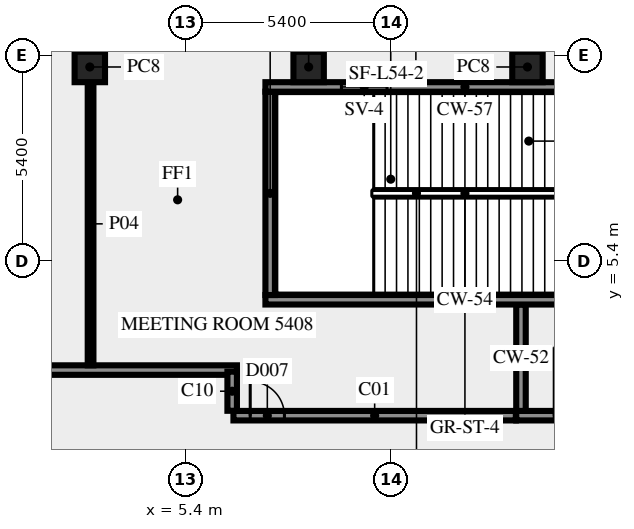
"""IFC4 building model, lengths in metres.
Left out: names, types, materials, properties, quantities, classifications, styles, units other than length and angle.
Written with IfcOpenShell. Run it as: python <this file> out.ifc"""

import sys

from ifc_helpers import new_model, si_unit, direction, frame, frame_2d, origin, origin_2d, place, context, subcontext, project, spatial, rectangle, extrude, element, fill, save


model = new_model("IFC4")
c1 = context("Model", 3, precision=1e-05, world=origin(), true_north=direction((0.0, 1.0)))
c2 = subcontext(c1, "Body", "Model", "MODEL_VIEW")
j1 = project(units=[si_unit("LENGTHUNIT", "METRE"), si_unit("PLANEANGLEUNIT", "RADIAN")], contexts=[c1])
p1 = place(None, origin())
s1 = spatial("IfcSite", under=j1, at=p1, CompositionType="ELEMENT")
p2 = place(p1, origin())
s2 = spatial("IfcBuilding", under=s1, at=p2, CompositionType="ELEMENT")
p3 = place(p2, frame((0.0, 0.0, 230.0)))
s3 = spatial("IfcBuildingStorey", under=s2, at=p3, CompositionType="ELEMENT", Elevation=230.0)
for number, where, z_axis, x_axis in (
    (1, (14.395, 10.5, 0.0), (0.0, 0.0, 1.0), (-1.0, 0.0, 0.0)),
    (2, (8.637, 10.5, 0.0), (0.0, 0.0, 1.0), (-1.0, 0.0, 0.0)),
    (3, (2.879, 10.5, 0.0), (0.0, 0.0, 1.0), (-1.0, 0.0, 0.0)),
):
    element("IfcColumn", number, at=place(p3, frame(where, z_axis=z_axis, x_axis=x_axis)), inside=s3, PredefinedType="COLUMN", context=c2, shape_type="SweptSolid", body=[
        extrude(rectangle(XDim=0.8, YDim=0.8, at=origin_2d()), origin(), (0.0, 0.0, 1.0), 3.65),
    ])
p4 = place(p3, frame((14.1, 1.325, 0.0), z_axis=(0.0, 0.0, 1.0), x_axis=(1.0, 0.0, 0.0)))
e4 = element("IfcWall", 4, at=p4, inside=s3, PredefinedType="SHEAR", context=c2, shape_type="SweptSolid", body=[
    extrude(rectangle(XDim=3.9, YDim=0.25, at=frame_2d((1.95, 0.0))), origin(), (0.0, 0.0, 1.0), 3.65),
])
p5 = place(p4, frame((1.0, 0.0, 0.0)))
e5 = element("IfcOpeningElement", 5, at=p5, cuts=e4, PredefinedType="OPENING", context=c2, shape_type="SweptSolid", body=[
    extrude(rectangle(XDim=1.8, YDim=2.1, at=frame_2d((0.9, 1.05))), frame((0.0, 0.135, 0.0), z_axis=(0.0, -1.0, 0.0), x_axis=(1.0, 0.0, 0.0)), (0.0, 0.0, 1.0), 0.27),
])
p6 = place(p3, frame((14.225, 1.45, 0.0), z_axis=(0.0, 0.0, 1.0), x_axis=(0.0, 1.0, 0.0)))
e6 = element("IfcWall", 6, at=p6, inside=s3, PredefinedType="SHEAR", context=c2, shape_type="SweptSolid", body=[
    extrude(rectangle(XDim=2.8, YDim=0.25, at=frame_2d((1.4, 0.0))), origin(), (0.0, 0.0, 1.0), 3.65),
])
p7 = place(p3, frame((7.5, 4.375, 0.0), z_axis=(0.0, 0.0, 1.0), x_axis=(1.0, 0.0, 0.0)))
e7 = element("IfcWall", 7, at=p7, inside=s3, PredefinedType="SHEAR", context=c2, shape_type="SweptSolid", body=[
    extrude(rectangle(XDim=10.5, YDim=0.25, at=frame_2d((5.25, 0.0))), origin(), (0.0, 0.0, 1.0), 3.65),
])
p8 = place(p7, frame((8.4, 0.0, 0.0)))
e8 = element("IfcOpeningElement", 8, at=p8, cuts=e7, PredefinedType="OPENING", context=c2, shape_type="SweptSolid", body=[
    extrude(rectangle(XDim=1.8, YDim=2.1, at=frame_2d((0.9, 1.05))), frame((0.0, 0.135, 0.0), z_axis=(0.0, -1.0, 0.0), x_axis=(1.0, 0.0, 0.0)), (0.0, 0.0, 1.0), 0.27),
])
p9 = place(p3, frame((7.625, 4.5, 0.0), z_axis=(0.0, 0.0, 1.0), x_axis=(0.0, 1.0, 0.0)))
e9 = element("IfcWall", 9, at=p9, inside=s3, PredefinedType="SHEAR", context=c2, shape_type="SweptSolid", body=[
    extrude(rectangle(XDim=5.35, YDim=0.25, at=frame_2d((2.675, 0.0))), origin(), (0.0, 0.0, 1.0), 3.65),
])
p10 = place(p3, frame((7.5, 9.975, 0.0), z_axis=(0.0, 0.0, 1.0), x_axis=(1.0, 0.0, 0.0)))
e10 = element("IfcWall", 10, at=p10, inside=s3, PredefinedType="SHEAR", context=c2, shape_type="SweptSolid", body=[
    extrude(rectangle(XDim=10.5, YDim=0.25, at=frame_2d((5.25, 0.0))), origin(), (0.0, 0.0, 1.0), 3.65),
])
p11 = place(p10, frame((2.0, 0.0, 1.0)))
e11 = element("IfcOpeningElement", 11, at=p11, cuts=e10, PredefinedType="OPENING", context=c2, shape_type="SweptSolid", body=[
    extrude(rectangle(XDim=1.2, YDim=1.2, at=frame_2d((0.6, 0.6))), frame((0.0, 0.135, 0.0), z_axis=(0.0, -1.0, 0.0), x_axis=(1.0, 0.0, 0.0)), (0.0, 0.0, 1.0), 0.27),
])
p12 = place(p3, frame((6.659, 1.325, 0.0), z_axis=(0.0, 0.0, 1.0), x_axis=(1.0, 0.0, 0.0)))
e12 = element("IfcWall", 12, at=p12, inside=s3, PredefinedType="SOLIDWALL", context=c2, shape_type="SweptSolid", body=[
    extrude(rectangle(XDim=7.431, YDim=0.25, at=frame_2d((3.716, 0.0))), origin(), (0.0, 0.0, 1.0), 3.65),
])
p13 = place(p12, frame((0.441, 0.0, 0.0)))
e13 = element("IfcOpeningElement", 13, at=p13, cuts=e12, PredefinedType="OPENING", context=c2, shape_type="SweptSolid", body=[
    extrude(rectangle(XDim=0.9, YDim=2.1, at=frame_2d((0.45, 1.05))), frame((0.0, 0.135, 0.0), z_axis=(0.0, -1.0, 0.0), x_axis=(1.0, 0.0, 0.0)), (0.0, 0.0, 1.0), 0.27),
])
p14 = place(p3, frame((-4.5, 2.525, 0.0), z_axis=(0.0, 0.0, 1.0), x_axis=(1.0, 0.0, 0.0)))
e14 = element("IfcWall", 14, at=p14, inside=s3, PredefinedType="SOLIDWALL", context=c2, shape_type="SweptSolid", body=[
    extrude(rectangle(XDim=11.25, YDim=0.25, at=frame_2d((5.625, 0.0))), origin(), (0.0, 0.0, 1.0), 3.65),
])
p15 = place(p14, frame((0.531, 0.0, 0.0)))
e15 = element("IfcOpeningElement", 15, at=p15, cuts=e14, PredefinedType="OPENING", context=c2, shape_type="SweptSolid", body=[
    extrude(rectangle(XDim=0.9, YDim=2.1, at=frame_2d((0.45, 1.05))), frame((0.0, 0.135, 0.0), z_axis=(0.0, -1.0, 0.0), x_axis=(1.0, 0.0, 0.0)), (0.0, 0.0, 1.0), 0.27),
])
p16 = place(p3, frame((6.625, 2.484, 0.0), z_axis=(0.0, 0.0, 1.0), x_axis=(0.0, -1.0, 0.0)))
e16 = element("IfcWall", 16, at=p16, inside=s3, PredefinedType="SOLIDWALL", context=c2, shape_type="SweptSolid", body=[
    extrude(rectangle(XDim=1.03, YDim=0.25, at=frame_2d((0.515, 0.0))), origin(), (0.0, 0.0, 1.0), 3.65),
])
p17 = place(p3, frame((2.899, 10.095, 0.0), z_axis=(0.0, 0.0, 1.0), x_axis=(0.0, -1.0, 0.0)))
e17 = element("IfcWall", 17, at=p17, inside=s3, PredefinedType="PARTITIONING", context=c2, shape_type="SweptSolid", body=[
    extrude(rectangle(XDim=7.445, YDim=0.15, at=frame_2d((3.723, 0.0))), origin(), (0.0, 0.0, 1.0), 3.65),
])
p18 = place(p5, origin())
e18 = element("IfcDoor", 18, at=p18, inside=s3, OperationType="DOUBLE_DOOR_SINGLE_SWING", PredefinedType="DOOR", context=c2, shape_type="SweptSolid", body=[
    extrude(rectangle(XDim=1.8, YDim=2.1, at=frame_2d((0.9, 1.05))), frame((0.0, 0.025, 0.0), z_axis=(0.0, -1.0, 0.0), x_axis=(1.0, 0.0, 0.0)), (0.0, 0.0, 1.0), 0.05),
])
fill(e5, e18)
p19 = place(p11, origin())
e19 = element("IfcWindow", 19, at=p19, inside=s3, PartitioningType="SINGLE_PANEL", PredefinedType="WINDOW", context=c2, shape_type="SweptSolid", body=[
    extrude(rectangle(XDim=1.2, YDim=1.2, at=frame_2d((0.6, 0.6))), frame((0.0, 0.03, 0.0), z_axis=(0.0, -1.0, 0.0), x_axis=(1.0, 0.0, 0.0)), (0.0, 0.0, 1.0), 0.06),
])
fill(e11, e19)
p20 = place(p13, origin())
e20 = element("IfcDoor", 20, at=p20, inside=s3, OperationType="SINGLE_SWING_LEFT", PredefinedType="DOOR", context=c2, shape_type="SweptSolid", body=[
    extrude(rectangle(XDim=0.9, YDim=2.1, at=frame_2d((0.45, 1.05))), frame((0.0, 0.025, 0.0), z_axis=(0.0, -1.0, 0.0), x_axis=(1.0, 0.0, 0.0)), (0.0, 0.0, 1.0), 0.05),
])
fill(e13, e20)
save(model, sys.argv[1])
